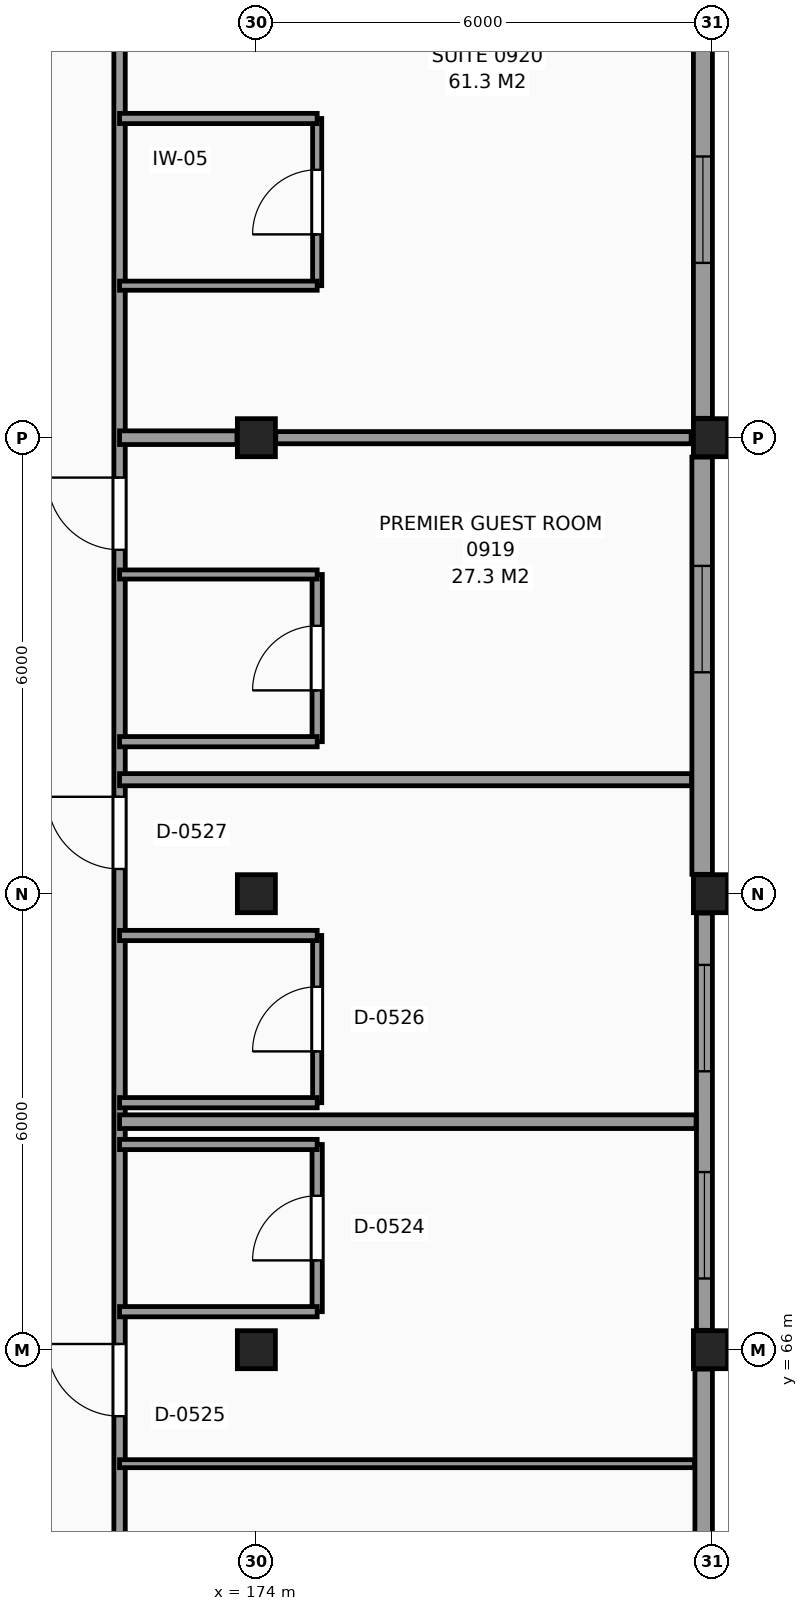
"""IFC4 building model, lengths in metres.
Left out: names, types, materials, properties, quantities, classifications, styles, units other than length and angle.
Written with IfcOpenShell. Run it as: python <this file> out.ifc"""

import sys

from ifc_helpers import new_model, si_unit, direction, frame, frame_2d, origin, origin_2d, place, context, subcontext, project, spatial, rectangle, extrude, element, fill, save


model = new_model("IFC4")
c1 = context("Model", 3, precision=1e-05, world=origin(), true_north=direction((0.0, 1.0)))
c2 = subcontext(c1, "Body", "Model", "MODEL_VIEW")
j1 = project(units=[si_unit("LENGTHUNIT", "METRE"), si_unit("PLANEANGLEUNIT", "RADIAN")], contexts=[c1])
p1 = place(None, origin())
s1 = spatial("IfcSite", under=j1, at=p1, CompositionType="ELEMENT")
p2 = place(p1, origin())
s2 = spatial("IfcBuilding", under=s1, at=p2, CompositionType="ELEMENT")
p3 = place(p2, frame((0.0, 0.0, 38.1)))
s3 = spatial("IfcBuildingStorey", under=s2, at=p3, CompositionType="ELEMENT", Elevation=38.1)
for number, where, z_axis, x_axis in (
    (1, (174.0, 66.0, 0.0), (0.0, 0.0, 1.0), (1.0, 0.0, 0.0)),
    (2, (174.0, 72.0, 0.0), (0.0, 0.0, 1.0), (1.0, 0.0, 0.0)),
    (3, (174.0, 78.0, 0.0), (0.0, 0.0, 1.0), (1.0, 0.0, 0.0)),
    (4, (180.0, 66.0, 0.0), (0.0, 0.0, 1.0), (1.0, 0.0, 0.0)),
    (5, (180.0, 72.0, 0.0), (0.0, 0.0, 1.0), (1.0, 0.0, 0.0)),
    (6, (180.0, 78.0, 0.0), (0.0, 0.0, 1.0), (1.0, 0.0, 0.0)),
):
    element("IfcColumn", number, at=place(p3, frame(where, z_axis=z_axis, x_axis=x_axis)), inside=s3, PredefinedType="COLUMN", context=c2, shape_type="SweptSolid", body=[
        extrude(rectangle(XDim=0.5, YDim=0.5, at=origin_2d()), origin(), (0.0, 0.0, 1.0), 3.3),
    ])
p4 = place(p3, frame((179.885, 60.255, 0.0), z_axis=(0.0, 0.0, 1.0), x_axis=(0.0, 1.0, 0.0)))
e7 = element("IfcWall", 7, at=p4, inside=s3, PredefinedType="SOLIDWALL", context=c2, shape_type="SweptSolid", body=[
    extrude(rectangle(XDim=5.49, YDim=0.23, at=frame_2d((2.745, 0.0))), origin(), (0.0, 0.0, 1.0), 2.41),
])
p5 = place(p3, frame((179.895, 66.255, 0.0), z_axis=(0.0, 0.0, 1.0), x_axis=(0.0, 1.0, 0.0)))
e8 = element("IfcWall", 8, at=p5, inside=s3, PredefinedType="SOLIDWALL", context=c2, shape_type="SweptSolid", body=[
    extrude(rectangle(XDim=5.49, YDim=0.21, at=frame_2d((2.745, 0.0))), origin(), (0.0, 0.0, 1.0), 2.41),
])
p6 = place(p5, frame((0.682, 0.0, 0.8)))
e9 = element("IfcOpeningElement", 9, at=p6, cuts=e8, PredefinedType="OPENING", context=c2, shape_type="SweptSolid", body=[
    extrude(rectangle(XDim=1.4, YDim=1.4, at=frame_2d((0.7, 0.7))), frame((0.0, 0.115, 0.0), z_axis=(0.0, -1.0, 0.0), x_axis=(1.0, 0.0, 0.0)), (0.0, 0.0, 1.0), 0.23),
])
p7 = place(p5, frame((3.408, 0.0, 0.8)))
e10 = element("IfcOpeningElement", 10, at=p7, cuts=e8, PredefinedType="OPENING", context=c2, shape_type="SweptSolid", body=[
    extrude(rectangle(XDim=1.4, YDim=1.4, at=frame_2d((0.7, 0.7))), frame((0.0, 0.115, 0.0), z_axis=(0.0, -1.0, 0.0), x_axis=(1.0, 0.0, 0.0)), (0.0, 0.0, 1.0), 0.23),
])
p8 = place(p3, frame((179.865, 72.255, 0.0), z_axis=(0.0, 0.0, 1.0), x_axis=(0.0, 1.0, 0.0)))
e11 = element("IfcWall", 11, at=p8, inside=s3, PredefinedType="SOLIDWALL", context=c2, shape_type="SweptSolid", body=[
    extrude(rectangle(XDim=5.49, YDim=0.27, at=frame_2d((2.745, 0.0))), origin(), (0.0, 0.0, 1.0), 2.41),
])
p9 = place(p8, frame((2.658, 0.0, 0.8)))
e12 = element("IfcOpeningElement", 12, at=p9, cuts=e11, PredefinedType="OPENING", context=c2, shape_type="SweptSolid", body=[
    extrude(rectangle(XDim=1.4, YDim=1.4, at=frame_2d((0.7, 0.7))), frame((0.0, 0.145, 0.0), z_axis=(0.0, -1.0, 0.0), x_axis=(1.0, 0.0, 0.0)), (0.0, 0.0, 1.0), 0.29),
])
p10 = place(p3, frame((179.875, 78.255, 0.0), z_axis=(0.0, 0.0, 1.0), x_axis=(0.0, 1.0, 0.0)))
e13 = element("IfcWall", 13, at=p10, inside=s3, PredefinedType="SOLIDWALL", context=c2, shape_type="SweptSolid", body=[
    extrude(rectangle(XDim=5.49, YDim=0.25, at=frame_2d((2.745, 0.0))), origin(), (0.0, 0.0, 1.0), 2.41),
])
p11 = place(p10, frame((2.045, 0.0, 0.8)))
e14 = element("IfcOpeningElement", 14, at=p11, cuts=e13, PredefinedType="OPENING", context=c2, shape_type="SweptSolid", body=[
    extrude(rectangle(XDim=1.4, YDim=1.4, at=frame_2d((0.7, 0.7))), frame((0.0, 0.135, 0.0), z_axis=(0.0, -1.0, 0.0), x_axis=(1.0, 0.0, 0.0)), (0.0, 0.0, 1.0), 0.27),
])
p12 = place(p3, frame((172.2, 42.215, 0.0), z_axis=(0.0, 0.0, 1.0), x_axis=(0.0, 1.0, 0.0)))
e15 = element("IfcWall", 15, at=p12, inside=s3, PredefinedType="PARTITIONING", context=c2, shape_type="SweptSolid", body=[
    extrude(rectangle(XDim=65.605, YDim=0.15, at=frame_2d((32.802, 0.0))), origin(), (0.0, 0.0, 1.0), 3.06),
])
p13 = place(p12, frame((0.46, 0.0, 0.0)))
e16 = element("IfcOpeningElement", 16, at=p13, cuts=e15, PredefinedType="OPENING", context=c2, shape_type="SweptSolid", body=[
    extrude(rectangle(XDim=0.95, YDim=2.1, at=frame_2d((0.475, 1.05))), frame((0.0, 0.085, 0.0), z_axis=(0.0, -1.0, 0.0), x_axis=(1.0, 0.0, 0.0)), (0.0, 0.0, 1.0), 0.17),
])
p14 = place(p12, frame((4.91, 0.0, 0.0)))
e17 = element("IfcOpeningElement", 17, at=p14, cuts=e15, PredefinedType="OPENING", context=c2, shape_type="SweptSolid", body=[
    extrude(rectangle(XDim=0.95, YDim=2.1, at=frame_2d((0.475, 1.05))), frame((0.0, 0.085, 0.0), z_axis=(0.0, -1.0, 0.0), x_axis=(1.0, 0.0, 0.0)), (0.0, 0.0, 1.0), 0.17),
])
p15 = place(p12, frame((12.11, 0.0, 0.0)))
e18 = element("IfcOpeningElement", 18, at=p15, cuts=e15, PredefinedType="OPENING", context=c2, shape_type="SweptSolid", body=[
    extrude(rectangle(XDim=0.95, YDim=2.1, at=frame_2d((0.475, 1.05))), frame((0.0, 0.085, 0.0), z_axis=(0.0, -1.0, 0.0), x_axis=(1.0, 0.0, 0.0)), (0.0, 0.0, 1.0), 0.17),
])
p16 = place(p12, frame((20.36, 0.0, 0.0)))
e19 = element("IfcOpeningElement", 19, at=p16, cuts=e15, PredefinedType="OPENING", context=c2, shape_type="SweptSolid", body=[
    extrude(rectangle(XDim=0.95, YDim=2.1, at=frame_2d((0.475, 1.05))), frame((0.0, 0.085, 0.0), z_axis=(0.0, -1.0, 0.0), x_axis=(1.0, 0.0, 0.0)), (0.0, 0.0, 1.0), 0.17),
])
p17 = place(p12, frame((22.91, 0.0, 0.0)))
e20 = element("IfcOpeningElement", 20, at=p17, cuts=e15, PredefinedType="OPENING", context=c2, shape_type="SweptSolid", body=[
    extrude(rectangle(XDim=0.95, YDim=2.1, at=frame_2d((0.475, 1.05))), frame((0.0, 0.085, 0.0), z_axis=(0.0, -1.0, 0.0), x_axis=(1.0, 0.0, 0.0)), (0.0, 0.0, 1.0), 0.17),
])
p18 = place(p12, frame((30.11, 0.0, 0.0)))
e21 = element("IfcOpeningElement", 21, at=p18, cuts=e15, PredefinedType="OPENING", context=c2, shape_type="SweptSolid", body=[
    extrude(rectangle(XDim=0.95, YDim=2.1, at=frame_2d((0.475, 1.05))), frame((0.0, 0.085, 0.0), z_axis=(0.0, -1.0, 0.0), x_axis=(1.0, 0.0, 0.0)), (0.0, 0.0, 1.0), 0.17),
])
p19 = place(p12, frame((34.31, 0.0, 0.0)))
e22 = element("IfcOpeningElement", 22, at=p19, cuts=e15, PredefinedType="OPENING", context=c2, shape_type="SweptSolid", body=[
    extrude(rectangle(XDim=0.95, YDim=2.1, at=frame_2d((0.475, 1.05))), frame((0.0, 0.085, 0.0), z_axis=(0.0, -1.0, 0.0), x_axis=(1.0, 0.0, 0.0)), (0.0, 0.0, 1.0), 0.17),
])
p20 = place(p12, frame((43.61, 0.0, 0.0)))
e23 = element("IfcOpeningElement", 23, at=p20, cuts=e15, PredefinedType="OPENING", context=c2, shape_type="SweptSolid", body=[
    extrude(rectangle(XDim=0.95, YDim=2.1, at=frame_2d((0.475, 1.05))), frame((0.0, 0.085, 0.0), z_axis=(0.0, -1.0, 0.0), x_axis=(1.0, 0.0, 0.0)), (0.0, 0.0, 1.0), 0.17),
])
p21 = place(p12, frame((48.11, 0.0, 0.0)))
e24 = element("IfcOpeningElement", 24, at=p21, cuts=e15, PredefinedType="OPENING", context=c2, shape_type="SweptSolid", body=[
    extrude(rectangle(XDim=0.95, YDim=2.1, at=frame_2d((0.475, 1.05))), frame((0.0, 0.085, 0.0), z_axis=(0.0, -1.0, 0.0), x_axis=(1.0, 0.0, 0.0)), (0.0, 0.0, 1.0), 0.17),
])
p22 = place(p12, frame((52.31, 0.0, 0.0)))
e25 = element("IfcOpeningElement", 25, at=p22, cuts=e15, PredefinedType="OPENING", context=c2, shape_type="SweptSolid", body=[
    extrude(rectangle(XDim=0.95, YDim=2.1, at=frame_2d((0.475, 1.05))), frame((0.0, 0.085, 0.0), z_axis=(0.0, -1.0, 0.0), x_axis=(1.0, 0.0, 0.0)), (0.0, 0.0, 1.0), 0.17),
])
p23 = place(p12, frame((54.51, 0.0, 0.0)))
e26 = element("IfcOpeningElement", 26, at=p23, cuts=e15, PredefinedType="OPENING", context=c2, shape_type="SweptSolid", body=[
    extrude(rectangle(XDim=0.95, YDim=2.1, at=frame_2d((0.475, 1.05))), frame((0.0, 0.085, 0.0), z_axis=(0.0, -1.0, 0.0), x_axis=(1.0, 0.0, 0.0)), (0.0, 0.0, 1.0), 0.17),
])
p24 = place(p12, frame((60.51, 0.0, 0.0)))
e27 = element("IfcOpeningElement", 27, at=p24, cuts=e15, PredefinedType="OPENING", context=c2, shape_type="SweptSolid", body=[
    extrude(rectangle(XDim=0.95, YDim=2.1, at=frame_2d((0.475, 1.05))), frame((0.0, 0.085, 0.0), z_axis=(0.0, -1.0, 0.0), x_axis=(1.0, 0.0, 0.0)), (0.0, 0.0, 1.0), 0.17),
])
p25 = place(p3, frame((174.8, 66.5, 0.0), z_axis=(0.0, 0.0, 1.0), x_axis=(0.0, 1.0, 0.0)))
e28 = element("IfcWall", 28, at=p25, inside=s3, PredefinedType="PARTITIONING", context=c2, shape_type="SweptSolid", body=[
    extrude(rectangle(XDim=2.2, YDim=0.135, at=frame_2d((1.1, 0.0))), origin(), (0.0, 0.0, 1.0), 3.06),
])
p26 = place(p25, frame((0.675, 0.0, 0.0)))
e29 = element("IfcOpeningElement", 29, at=p26, cuts=e28, PredefinedType="OPENING", context=c2, shape_type="SweptSolid", body=[
    extrude(rectangle(XDim=0.85, YDim=2.1, at=frame_2d((0.425, 1.05))), frame((0.0, 0.078, 0.0), z_axis=(0.0, -1.0, 0.0), x_axis=(1.0, 0.0, 0.0)), (0.0, 0.0, 1.0), 0.155),
])
p27 = place(p3, frame((174.8, 69.25, 0.0), z_axis=(0.0, 0.0, 1.0), x_axis=(0.0, 1.0, 0.0)))
e30 = element("IfcWall", 30, at=p27, inside=s3, PredefinedType="PARTITIONING", context=c2, shape_type="SweptSolid", body=[
    extrude(rectangle(XDim=2.2, YDim=0.12, at=frame_2d((1.1, 0.0))), origin(), (0.0, 0.0, 1.0), 3.06),
])
p28 = place(p27, frame((0.675, 0.0, 0.0)))
e31 = element("IfcOpeningElement", 31, at=p28, cuts=e30, PredefinedType="OPENING", context=c2, shape_type="SweptSolid", body=[
    extrude(rectangle(XDim=0.85, YDim=2.1, at=frame_2d((0.425, 1.05))), frame((0.0, 0.07, 0.0), z_axis=(0.0, -1.0, 0.0), x_axis=(1.0, 0.0, 0.0)), (0.0, 0.0, 1.0), 0.14),
])
p29 = place(p3, frame((174.8, 74.0, 0.0), z_axis=(0.0, 0.0, 1.0), x_axis=(0.0, 1.0, 0.0)))
e32 = element("IfcWall", 32, at=p29, inside=s3, PredefinedType="PARTITIONING", context=c2, shape_type="SweptSolid", body=[
    extrude(rectangle(XDim=2.2, YDim=0.135, at=frame_2d((1.1, 0.0))), origin(), (0.0, 0.0, 1.0), 3.06),
])
p30 = place(p29, frame((0.675, 0.0, 0.0)))
e33 = element("IfcOpeningElement", 33, at=p30, cuts=e32, PredefinedType="OPENING", context=c2, shape_type="SweptSolid", body=[
    extrude(rectangle(XDim=0.85, YDim=2.1, at=frame_2d((0.425, 1.05))), frame((0.0, 0.078, 0.0), z_axis=(0.0, -1.0, 0.0), x_axis=(1.0, 0.0, 0.0)), (0.0, 0.0, 1.0), 0.155),
])
p31 = place(p3, frame((174.8, 80.0, 0.0), z_axis=(0.0, 0.0, 1.0), x_axis=(0.0, 1.0, 0.0)))
e34 = element("IfcWall", 34, at=p31, inside=s3, PredefinedType="PARTITIONING", context=c2, shape_type="SweptSolid", body=[
    extrude(rectangle(XDim=2.2, YDim=0.12, at=frame_2d((1.1, 0.0))), origin(), (0.0, 0.0, 1.0), 3.06),
])
p32 = place(p31, frame((0.675, 0.0, 0.0)))
e35 = element("IfcOpeningElement", 35, at=p32, cuts=e34, PredefinedType="OPENING", context=c2, shape_type="SweptSolid", body=[
    extrude(rectangle(XDim=0.85, YDim=2.1, at=frame_2d((0.425, 1.05))), frame((0.0, 0.07, 0.0), z_axis=(0.0, -1.0, 0.0), x_axis=(1.0, 0.0, 0.0)), (0.0, 0.0, 1.0), 0.14),
])
p33 = place(p3, frame((172.2, 64.5, 0.0), z_axis=(0.0, 0.0, 1.0), x_axis=(1.0, 0.0, 0.0)))
e36 = element("IfcWall", 36, at=p33, inside=s3, PredefinedType="PARTITIONING", context=c2, shape_type="SweptSolid", body=[
    extrude(rectangle(XDim=7.565, YDim=0.105, at=frame_2d((3.782, 0.0))), origin(), (0.0, 0.0, 1.0), 3.06),
])
for number, where, z_axis, x_axis in (
    (37, (172.2, 66.5, 0.0), (0.0, 0.0, 1.0), (1.0, 0.0, 0.0)),
    (38, (172.2, 68.7, 0.0), (0.0, 0.0, 1.0), (1.0, 0.0, 0.0)),
):
    element("IfcWall", number, at=place(p3, frame(where, z_axis=z_axis, x_axis=x_axis)), inside=s3, PredefinedType="PARTITIONING", context=c2, shape_type="SweptSolid", body=[
        extrude(rectangle(XDim=2.6, YDim=0.135, at=frame_2d((1.3, 0.0))), origin(), (0.0, 0.0, 1.0), 3.06),
    ])
p34 = place(p3, frame((172.2, 69.0, 0.0), z_axis=(0.0, 0.0, 1.0), x_axis=(1.0, 0.0, 0.0)))
e39 = element("IfcWall", 39, at=p34, inside=s3, PredefinedType="PARTITIONING", context=c2, shape_type="SweptSolid", body=[
    extrude(rectangle(XDim=7.585, YDim=0.18, at=frame_2d((3.792, 0.0))), origin(), (0.0, 0.0, 1.0), 3.06),
])
for number, where, z_axis, x_axis in (
    (40, (172.2, 69.25, 0.0), (0.0, 0.0, 1.0), (1.0, 0.0, 0.0)),
    (41, (172.2, 71.45, 0.0), (0.0, 0.0, 1.0), (1.0, 0.0, 0.0)),
):
    element("IfcWall", number, at=place(p3, frame(where, z_axis=z_axis, x_axis=x_axis)), inside=s3, PredefinedType="PARTITIONING", context=c2, shape_type="SweptSolid", body=[
        extrude(rectangle(XDim=2.6, YDim=0.135, at=frame_2d((1.3, 0.0))), origin(), (0.0, 0.0, 1.0), 3.06),
    ])
p35 = place(p3, frame((172.2, 73.5, 0.0), z_axis=(0.0, 0.0, 1.0), x_axis=(1.0, 0.0, 0.0)))
e42 = element("IfcWall", 42, at=p35, inside=s3, PredefinedType="PARTITIONING", context=c2, shape_type="SweptSolid", body=[
    extrude(rectangle(XDim=7.525, YDim=0.16, at=frame_2d((3.763, 0.0))), origin(), (0.0, 0.0, 1.0), 3.06),
])
p36 = place(p3, frame((172.2, 74.0, 0.0), z_axis=(0.0, 0.0, 1.0), x_axis=(1.0, 0.0, 0.0)))
e43 = element("IfcWall", 43, at=p36, inside=s3, PredefinedType="PARTITIONING", context=c2, shape_type="SweptSolid", body=[
    extrude(rectangle(XDim=2.6, YDim=0.135, at=frame_2d((1.3, 0.0))), origin(), (0.0, 0.0, 1.0), 3.06),
])
p37 = place(p3, frame((172.2, 76.2, 0.0), z_axis=(0.0, 0.0, 1.0), x_axis=(1.0, 0.0, 0.0)))
e44 = element("IfcWall", 44, at=p37, inside=s3, PredefinedType="PARTITIONING", context=c2, shape_type="SweptSolid", body=[
    extrude(rectangle(XDim=2.6, YDim=0.12, at=frame_2d((1.3, 0.0))), origin(), (0.0, 0.0, 1.0), 3.06),
])
p38 = place(p3, frame((172.2, 78.0, 0.0), z_axis=(0.0, 0.0, 1.0), x_axis=(1.0, 0.0, 0.0)))
e45 = element("IfcWall", 45, at=p38, inside=s3, PredefinedType="PARTITIONING", context=c2, shape_type="SweptSolid", body=[
    extrude(rectangle(XDim=1.545, YDim=0.18, at=frame_2d((0.772, 0.0))), origin(), (0.0, 0.0, 1.0), 2.26),
])
p39 = place(p3, frame((174.255, 78.0, 0.0), z_axis=(0.0, 0.0, 1.0), x_axis=(1.0, 0.0, 0.0)))
e46 = element("IfcWall", 46, at=p39, inside=s3, PredefinedType="PARTITIONING", context=c2, shape_type="SweptSolid", body=[
    extrude(rectangle(XDim=5.465, YDim=0.16, at=frame_2d((2.732, 0.0))), origin(), (0.0, 0.0, 1.0), 2.26),
])
p40 = place(p3, frame((172.2, 80.0, 0.0), z_axis=(0.0, 0.0, 1.0), x_axis=(1.0, 0.0, 0.0)))
e47 = element("IfcWall", 47, at=p40, inside=s3, PredefinedType="PARTITIONING", context=c2, shape_type="SweptSolid", body=[
    extrude(rectangle(XDim=2.6, YDim=0.12, at=frame_2d((1.3, 0.0))), origin(), (0.0, 0.0, 1.0), 3.06),
])
p41 = place(p3, frame((172.2, 82.2, 0.0), z_axis=(0.0, 0.0, 1.0), x_axis=(1.0, 0.0, 0.0)))
e48 = element("IfcWall", 48, at=p41, inside=s3, PredefinedType="PARTITIONING", context=c2, shape_type="SweptSolid", body=[
    extrude(rectangle(XDim=2.6, YDim=0.135, at=frame_2d((1.3, 0.0))), origin(), (0.0, 0.0, 1.0), 3.06),
])
p42 = place(p6, origin())
e49 = element("IfcWindow", 49, at=p42, inside=s3, PartitioningType="SINGLE_PANEL", PredefinedType="WINDOW", context=c2, shape_type="SweptSolid", body=[
    extrude(rectangle(XDim=1.4, YDim=1.4, at=frame_2d((0.7, 0.7))), frame((0.0, 0.03, 0.0), z_axis=(0.0, -1.0, 0.0), x_axis=(1.0, 0.0, 0.0)), (0.0, 0.0, 1.0), 0.06),
])
fill(e9, e49)
p43 = place(p7, origin())
e50 = element("IfcWindow", 50, at=p43, inside=s3, PartitioningType="SINGLE_PANEL", PredefinedType="WINDOW", context=c2, shape_type="SweptSolid", body=[
    extrude(rectangle(XDim=1.4, YDim=1.4, at=frame_2d((0.7, 0.7))), frame((0.0, 0.03, 0.0), z_axis=(0.0, -1.0, 0.0), x_axis=(1.0, 0.0, 0.0)), (0.0, 0.0, 1.0), 0.06),
])
fill(e10, e50)
p44 = place(p9, origin())
e51 = element("IfcWindow", 51, at=p44, inside=s3, PartitioningType="SINGLE_PANEL", PredefinedType="WINDOW", context=c2, shape_type="SweptSolid", body=[
    extrude(rectangle(XDim=1.4, YDim=1.4, at=frame_2d((0.7, 0.7))), frame((0.0, 0.03, 0.0), z_axis=(0.0, -1.0, 0.0), x_axis=(1.0, 0.0, 0.0)), (0.0, 0.0, 1.0), 0.06),
])
fill(e12, e51)
p45 = place(p11, origin())
e52 = element("IfcWindow", 52, at=p45, inside=s3, PartitioningType="SINGLE_PANEL", PredefinedType="WINDOW", context=c2, shape_type="SweptSolid", body=[
    extrude(rectangle(XDim=1.4, YDim=1.4, at=frame_2d((0.7, 0.7))), frame((0.0, 0.03, 0.0), z_axis=(0.0, -1.0, 0.0), x_axis=(1.0, 0.0, 0.0)), (0.0, 0.0, 1.0), 0.06),
])
fill(e14, e52)
p46 = place(p26, origin())
e53 = element("IfcDoor", 53, at=p46, inside=s3, OperationType="SINGLE_SWING_LEFT", PredefinedType="DOOR", context=c2, shape_type="SweptSolid", body=[
    extrude(rectangle(XDim=0.85, YDim=2.1, at=frame_2d((0.425, 1.05))), frame((0.0, 0.025, 0.0), z_axis=(0.0, -1.0, 0.0), x_axis=(1.0, 0.0, 0.0)), (0.0, 0.0, 1.0), 0.05),
])
fill(e29, e53)
p47 = place(p17, origin())
e54 = element("IfcDoor", 54, at=p47, inside=s3, OperationType="SINGLE_SWING_RIGHT", PredefinedType="DOOR", context=c2, shape_type="SweptSolid", body=[
    extrude(rectangle(XDim=0.95, YDim=2.1, at=frame_2d((0.475, 1.05))), frame((0.0, 0.025, 0.0), z_axis=(0.0, -1.0, 0.0), x_axis=(1.0, 0.0, 0.0)), (0.0, 0.0, 1.0), 0.05),
])
fill(e20, e54)
p48 = place(p28, origin())
e55 = element("IfcDoor", 55, at=p48, inside=s3, OperationType="SINGLE_SWING_LEFT", PredefinedType="DOOR", context=c2, shape_type="SweptSolid", body=[
    extrude(rectangle(XDim=0.85, YDim=2.1, at=frame_2d((0.425, 1.05))), frame((0.0, 0.025, 0.0), z_axis=(0.0, -1.0, 0.0), x_axis=(1.0, 0.0, 0.0)), (0.0, 0.0, 1.0), 0.05),
])
fill(e31, e55)
p49 = place(p18, origin())
e56 = element("IfcDoor", 56, at=p49, inside=s3, OperationType="SINGLE_SWING_RIGHT", PredefinedType="DOOR", context=c2, shape_type="SweptSolid", body=[
    extrude(rectangle(XDim=0.95, YDim=2.1, at=frame_2d((0.475, 1.05))), frame((0.0, 0.025, 0.0), z_axis=(0.0, -1.0, 0.0), x_axis=(1.0, 0.0, 0.0)), (0.0, 0.0, 1.0), 0.05),
])
fill(e21, e56)
p50 = place(p30, origin())
e57 = element("IfcDoor", 57, at=p50, inside=s3, OperationType="SINGLE_SWING_LEFT", PredefinedType="DOOR", context=c2, shape_type="SweptSolid", body=[
    extrude(rectangle(XDim=0.85, YDim=2.1, at=frame_2d((0.425, 1.05))), frame((0.0, 0.025, 0.0), z_axis=(0.0, -1.0, 0.0), x_axis=(1.0, 0.0, 0.0)), (0.0, 0.0, 1.0), 0.05),
])
fill(e33, e57)
p51 = place(p19, origin())
e58 = element("IfcDoor", 58, at=p51, inside=s3, OperationType="SINGLE_SWING_RIGHT", PredefinedType="DOOR", context=c2, shape_type="SweptSolid", body=[
    extrude(rectangle(XDim=0.95, YDim=2.1, at=frame_2d((0.475, 1.05))), frame((0.0, 0.025, 0.0), z_axis=(0.0, -1.0, 0.0), x_axis=(1.0, 0.0, 0.0)), (0.0, 0.0, 1.0), 0.05),
])
fill(e22, e58)
p52 = place(p32, origin())
e59 = element("IfcDoor", 59, at=p52, inside=s3, OperationType="SINGLE_SWING_LEFT", PredefinedType="DOOR", context=c2, shape_type="SweptSolid", body=[
    extrude(rectangle(XDim=0.85, YDim=2.1, at=frame_2d((0.425, 1.05))), frame((0.0, 0.025, 0.0), z_axis=(0.0, -1.0, 0.0), x_axis=(1.0, 0.0, 0.0)), (0.0, 0.0, 1.0), 0.05),
])
fill(e35, e59)
save(model, sys.argv[1])
